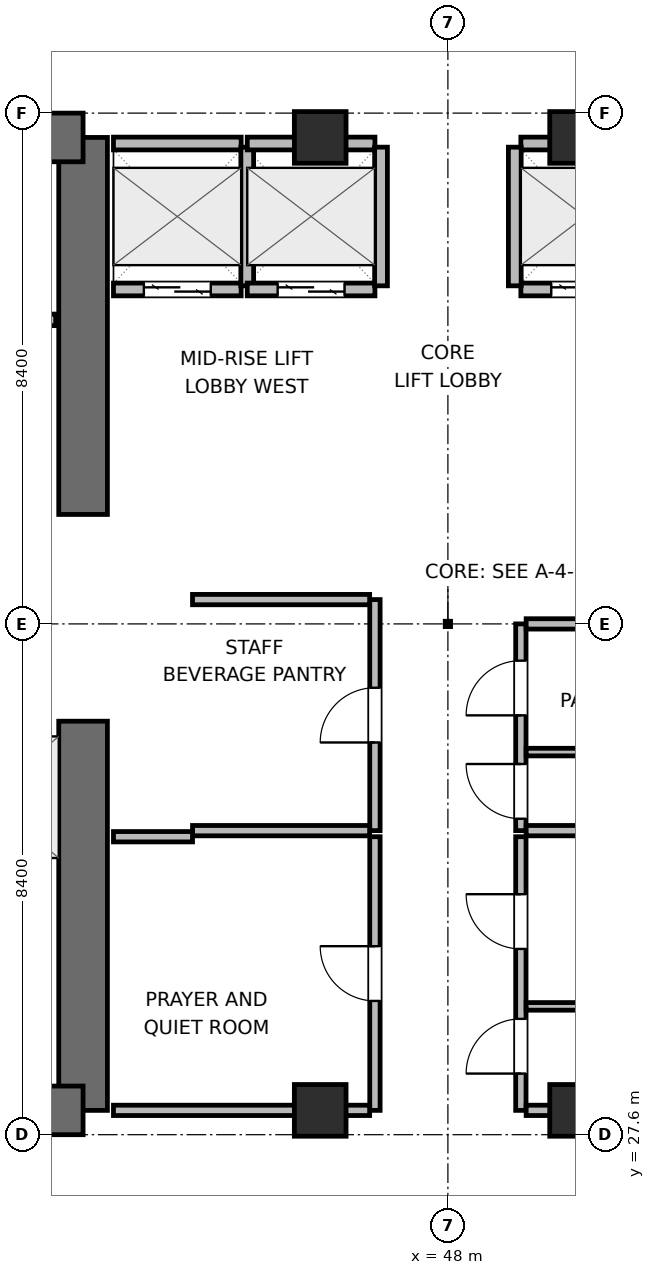
"""IFC4 building model, lengths in metres.
Left out: names, types, materials, properties, quantities, classifications, styles, units other than length and angle.
Written with IfcOpenShell. Run it as: python <this file> out.ifc"""

import sys

from ifc_helpers import new_model, si_unit, direction, frame, frame_2d, origin, origin_2d, place, context, subcontext, project, spatial, rectangle, extrude, element, fill, save


model = new_model("IFC4")
c1 = context("Model", 3, precision=1e-05, world=origin(), true_north=direction((0.0, 1.0)))
c2 = subcontext(c1, "Body", "Model", "MODEL_VIEW")
j1 = project(units=[si_unit("LENGTHUNIT", "METRE"), si_unit("PLANEANGLEUNIT", "RADIAN")], contexts=[c1])
p1 = place(None, origin())
s1 = spatial("IfcSite", under=j1, at=p1, CompositionType="ELEMENT")
p2 = place(p1, origin())
s2 = spatial("IfcBuilding", under=s1, at=p2, CompositionType="ELEMENT")
p3 = place(p2, frame((0.0, 0.0, 158.4)))
s3 = spatial("IfcBuildingStorey", under=s2, at=p3, CompositionType="ELEMENT", Elevation=158.4)
p4 = place(p3, frame((42.0, 28.0, 0.0), z_axis=(0.0, 0.0, 1.0), x_axis=(0.0, 1.0, 0.0)))
e1 = element("IfcWall", 1, at=p4, inside=s3, PredefinedType="SHEAR", context=c2, shape_type="SweptSolid", body=[
    extrude(rectangle(XDim=6.4, YDim=0.8, at=frame_2d((3.2, 0.0))), origin(), (0.0, 0.0, 1.0), 3.9),
])
p5 = place(p3, frame((42.0, 37.8, 0.0), z_axis=(0.0, 0.0, 1.0), x_axis=(0.0, 1.0, 0.0)))
e2 = element("IfcWall", 2, at=p5, inside=s3, PredefinedType="SHEAR", context=c2, shape_type="SweptSolid", body=[
    extrude(rectangle(XDim=6.2, YDim=0.8, at=frame_2d((3.1, 0.0))), origin(), (0.0, 0.0, 1.0), 3.9),
])
p6 = place(p3, frame((32.8, 28.0, 0.0), z_axis=(0.0, 0.0, 1.0), x_axis=(1.0, 0.0, 0.0)))
e3 = element("IfcWall", 3, at=p6, inside=s3, PredefinedType="SHEAR", context=c2, shape_type="SweptSolid", body=[
    extrude(rectangle(XDim=9.2, YDim=0.8, at=frame_2d((4.6, 0.0))), origin(), (0.0, 0.0, 1.0), 3.9),
])
p7 = place(p6, frame((5.025, 0.0, 0.0)))
e4 = element("IfcOpeningElement", 4, at=p7, cuts=e3, PredefinedType="OPENING", context=c2, shape_type="SweptSolid", body=[
    extrude(rectangle(XDim=1.05, YDim=2.04, at=frame_2d((0.525, 1.02))), frame((0.0, 0.41, 0.0), z_axis=(0.0, -1.0, 0.0), x_axis=(1.0, 0.0, 0.0)), (0.0, 0.0, 1.0), 0.82),
])
p8 = place(p3, frame((32.8, 44.0, 0.0), z_axis=(0.0, 0.0, 1.0), x_axis=(1.0, 0.0, 0.0)))
e5 = element("IfcWall", 5, at=p8, inside=s3, PredefinedType="SHEAR", context=c2, shape_type="SweptSolid", body=[
    extrude(rectangle(XDim=9.2, YDim=0.8, at=frame_2d((4.6, 0.0))), origin(), (0.0, 0.0, 1.0), 3.9),
])
p9 = place(p8, frame((1.025, 0.0, 0.0)))
e6 = element("IfcOpeningElement", 6, at=p9, cuts=e5, PredefinedType="OPENING", context=c2, shape_type="SweptSolid", body=[
    extrude(rectangle(XDim=0.95, YDim=2.04, at=frame_2d((0.475, 1.02))), frame((0.0, 0.41, 0.0), z_axis=(0.0, -1.0, 0.0), x_axis=(1.0, 0.0, 0.0)), (0.0, 0.0, 1.0), 0.82),
])
p10 = place(p8, frame((4.275, 0.0, 0.0)))
e7 = element("IfcOpeningElement", 7, at=p10, cuts=e5, PredefinedType="OPENING", context=c2, shape_type="SweptSolid", body=[
    extrude(rectangle(XDim=0.9, YDim=2.02, at=frame_2d((0.45, 1.01))), frame((0.0, 0.41, 0.0), z_axis=(0.0, -1.0, 0.0), x_axis=(1.0, 0.0, 0.0)), (0.0, 0.0, 1.0), 0.82),
])
p11 = place(p8, frame((7.175, 0.0, 0.0)))
e8 = element("IfcOpeningElement", 8, at=p11, cuts=e5, PredefinedType="OPENING", context=c2, shape_type="SweptSolid", body=[
    extrude(rectangle(XDim=0.9, YDim=2.02, at=frame_2d((0.45, 1.01))), frame((0.0, 0.41, 0.0), z_axis=(0.0, -1.0, 0.0), x_axis=(1.0, 0.0, 0.0)), (0.0, 0.0, 1.0), 0.82),
])
for number, where, z_axis, x_axis in (
    (9, (45.9, 28.0, 0.0), (0.0, 0.0, 1.0), (1.0, 0.0, 0.0)),
    (10, (50.1, 28.0, 0.0), (0.0, 0.0, 1.0), (1.0, 0.0, 0.0)),
    (11, (45.9, 44.0, 0.0), (0.0, 0.0, 1.0), (1.0, 0.0, 0.0)),
    (12, (50.1, 44.0, 0.0), (0.0, 0.0, 1.0), (1.0, 0.0, 0.0)),
):
    element("IfcColumn", number, at=place(p3, frame(where, z_axis=z_axis, x_axis=x_axis)), inside=s3, PredefinedType="COLUMN", context=c2, shape_type="SweptSolid", body=[
        extrude(rectangle(XDim=0.85, YDim=0.85, at=origin_2d()), origin(), (0.0, 0.0, 1.0), 3.9),
    ])
p12 = place(p3, frame((33.25, 41.0, 0.0), z_axis=(0.0, 0.0, 1.0), x_axis=(1.0, 0.0, 0.0)))
e13 = element("IfcWall", 13, at=p12, inside=s3, PredefinedType="PLUMBINGWALL", context=c2, shape_type="SweptSolid", body=[
    extrude(rectangle(XDim=8.3, YDim=0.19, at=frame_2d((4.15, 0.0))), origin(), (0.0, 0.0, 1.0), 3.68),
])
p13 = place(p3, frame((42.5, 41.5, 0.0), z_axis=(0.0, 0.0, 1.0), x_axis=(1.0, 0.0, 0.0)))
e14 = element("IfcWall", 14, at=p13, inside=s3, PredefinedType="PARTITIONING", context=c2, shape_type="SweptSolid", body=[
    extrude(rectangle(XDim=2.1, YDim=0.21, at=frame_2d((1.05, 0.0))), origin(), (0.0, 0.0, 1.0), 3.68),
])
p14 = place(p13, frame((0.5, 0.0, 0.0)))
e15 = element("IfcOpeningElement", 15, at=p14, cuts=e14, PredefinedType="OPENING", context=c2, shape_type="SweptSolid", body=[
    extrude(rectangle(XDim=1.1, YDim=2.04, at=frame_2d((0.55, 1.02))), frame((0.0, 0.115, 0.0), z_axis=(0.0, -1.0, 0.0), x_axis=(1.0, 0.0, 0.0)), (0.0, 0.0, 1.0), 0.23),
])
p15 = place(p3, frame((42.5, 43.9, 0.0), z_axis=(0.0, 0.0, 1.0), x_axis=(1.0, 0.0, 0.0)))
e16 = element("IfcWall", 16, at=p15, inside=s3, PredefinedType="PARTITIONING", context=c2, shape_type="SweptSolid", body=[
    extrude(rectangle(XDim=2.1, YDim=0.21, at=frame_2d((1.05, 0.0))), origin(), (0.0, 0.0, 1.0), 2.565),
])
p16 = place(p3, frame((44.7, 41.56, 0.0), z_axis=(0.0, 0.0, 1.0), x_axis=(0.0, 1.0, 0.0)))
e17 = element("IfcWall", 17, at=p16, inside=s3, PredefinedType="PARTITIONING", context=c2, shape_type="SweptSolid", body=[
    extrude(rectangle(XDim=2.28, YDim=0.21, at=frame_2d((1.14, 0.0))), origin(), (0.0, 0.0, 1.0), 3.68),
])
p17 = place(p3, frame((44.7, 41.5, 0.0), z_axis=(0.0, 0.0, 1.0), x_axis=(1.0, 0.0, 0.0)))
e18 = element("IfcWall", 18, at=p17, inside=s3, PredefinedType="PARTITIONING", context=c2, shape_type="SweptSolid", body=[
    extrude(rectangle(XDim=2.1, YDim=0.21, at=frame_2d((1.05, 0.0))), origin(), (0.0, 0.0, 1.0), 3.68),
])
p18 = place(p17, frame((0.5, 0.0, 0.0)))
e19 = element("IfcOpeningElement", 19, at=p18, cuts=e18, PredefinedType="OPENING", context=c2, shape_type="SweptSolid", body=[
    extrude(rectangle(XDim=1.1, YDim=2.04, at=frame_2d((0.55, 1.02))), frame((0.0, 0.115, 0.0), z_axis=(0.0, -1.0, 0.0), x_axis=(1.0, 0.0, 0.0)), (0.0, 0.0, 1.0), 0.23),
])
p19 = place(p3, frame((44.7, 43.9, 0.0), z_axis=(0.0, 0.0, 1.0), x_axis=(1.0, 0.0, 0.0)))
e20 = element("IfcWall", 20, at=p19, inside=s3, PredefinedType="PARTITIONING", context=c2, shape_type="SweptSolid", body=[
    extrude(rectangle(XDim=2.1, YDim=0.21, at=frame_2d((1.05, 0.0))), origin(), (0.0, 0.0, 1.0), 2.565),
])
p20 = place(p3, frame((46.9, 41.56, 0.0), z_axis=(0.0, 0.0, 1.0), x_axis=(0.0, 1.0, 0.0)))
e21 = element("IfcWall", 21, at=p20, inside=s3, PredefinedType="PARTITIONING", context=c2, shape_type="SweptSolid", body=[
    extrude(rectangle(XDim=2.28, YDim=0.21, at=frame_2d((1.14, 0.0))), origin(), (0.0, 0.0, 1.0), 3.68),
])
p21 = place(p3, frame((49.2, 41.5, 0.0), z_axis=(0.0, 0.0, 1.0), x_axis=(1.0, 0.0, 0.0)))
e22 = element("IfcWall", 22, at=p21, inside=s3, PredefinedType="PARTITIONING", context=c2, shape_type="SweptSolid", body=[
    extrude(rectangle(XDim=2.1, YDim=0.21, at=frame_2d((1.05, 0.0))), origin(), (0.0, 0.0, 1.0), 3.68),
])
p22 = place(p21, frame((0.5, 0.0, 0.0)))
e23 = element("IfcOpeningElement", 23, at=p22, cuts=e22, PredefinedType="OPENING", context=c2, shape_type="SweptSolid", body=[
    extrude(rectangle(XDim=1.1, YDim=2.04, at=frame_2d((0.55, 1.02))), frame((0.0, 0.115, 0.0), z_axis=(0.0, -1.0, 0.0), x_axis=(1.0, 0.0, 0.0)), (0.0, 0.0, 1.0), 0.23),
])
p23 = place(p3, frame((49.2, 43.9, 0.0), z_axis=(0.0, 0.0, 1.0), x_axis=(1.0, 0.0, 0.0)))
e24 = element("IfcWall", 24, at=p23, inside=s3, PredefinedType="PARTITIONING", context=c2, shape_type="SweptSolid", body=[
    extrude(rectangle(XDim=2.1, YDim=0.21, at=frame_2d((1.05, 0.0))), origin(), (0.0, 0.0, 1.0), 2.565),
])
p24 = place(p3, frame((49.1, 41.56, 0.0), z_axis=(0.0, 0.0, 1.0), x_axis=(0.0, 1.0, 0.0)))
e25 = element("IfcWall", 25, at=p24, inside=s3, PredefinedType="PARTITIONING", context=c2, shape_type="SweptSolid", body=[
    extrude(rectangle(XDim=2.28, YDim=0.21, at=frame_2d((1.14, 0.0))), origin(), (0.0, 0.0, 1.0), 3.68),
])
p25 = place(p3, frame((46.8, 32.6, 0.0), z_axis=(0.0, 0.0, 1.0), x_axis=(0.0, 1.0, 0.0)))
e26 = element("IfcWall", 26, at=p25, inside=s3, PredefinedType="PARTITIONING", context=c2, shape_type="SweptSolid", body=[
    extrude(rectangle(XDim=3.8, YDim=0.17, at=frame_2d((1.9, 0.0))), origin(), (0.0, 0.0, 1.0), 3.68),
])
p26 = place(p25, frame((1.45, 0.0, 0.0)))
e27 = element("IfcOpeningElement", 27, at=p26, cuts=e26, PredefinedType="OPENING", context=c2, shape_type="SweptSolid", body=[
    extrude(rectangle(XDim=0.9, YDim=2.02, at=frame_2d((0.45, 1.01))), frame((0.0, 0.095, 0.0), z_axis=(0.0, -1.0, 0.0), x_axis=(1.0, 0.0, 0.0)), (0.0, 0.0, 1.0), 0.19),
])
for number, where, z_axis, x_axis in (
    (28, (43.8, 32.6, 0.0), (0.0, 0.0, 1.0), (1.0, 0.0, 0.0)),
    (29, (43.8, 36.4, 0.0), (0.0, 0.0, 1.0), (1.0, 0.0, 0.0)),
):
    element("IfcWall", number, at=place(p3, frame(where, z_axis=z_axis, x_axis=x_axis)), inside=s3, PredefinedType="PARTITIONING", context=c2, shape_type="SweptSolid", body=[
        extrude(rectangle(XDim=2.913, YDim=0.17, at=frame_2d((1.457, 0.0))), origin(), (0.0, 0.0, 1.0), 3.68),
    ])
p27 = place(p3, frame((49.2, 32.6, 0.0), z_axis=(0.0, 0.0, 1.0), x_axis=(0.0, 1.0, 0.0)))
e30 = element("IfcWall", 30, at=p27, inside=s3, PredefinedType="PARTITIONING", context=c2, shape_type="SweptSolid", body=[
    extrude(rectangle(XDim=3.4, YDim=0.17, at=frame_2d((1.7, 0.0))), origin(), (0.0, 0.0, 1.0), 3.68),
])
p28 = place(p27, frame((0.196, 0.0, 0.0)))
e31 = element("IfcOpeningElement", 31, at=p28, cuts=e30, PredefinedType="OPENING", context=c2, shape_type="SweptSolid", body=[
    extrude(rectangle(XDim=0.9, YDim=2.02, at=frame_2d((0.45, 1.01))), frame((0.0, 0.095, 0.0), z_axis=(0.0, -1.0, 0.0), x_axis=(1.0, 0.0, 0.0)), (0.0, 0.0, 1.0), 0.19),
])
p29 = place(p27, frame((1.896, 0.0, 0.0)))
e32 = element("IfcOpeningElement", 32, at=p29, cuts=e30, PredefinedType="OPENING", context=c2, shape_type="SweptSolid", body=[
    extrude(rectangle(XDim=0.9, YDim=2.02, at=frame_2d((0.45, 1.01))), frame((0.0, 0.095, 0.0), z_axis=(0.0, -1.0, 0.0), x_axis=(1.0, 0.0, 0.0)), (0.0, 0.0, 1.0), 0.19),
])
for number, where, z_axis, x_axis in (
    (33, (49.287, 32.6, 0.0), (0.0, 0.0, 1.0), (1.0, 0.0, 0.0)),
    (34, (49.287, 36.0, 0.0), (0.0, 0.0, 1.0), (1.0, 0.0, 0.0)),
):
    element("IfcWall", number, at=place(p3, frame(where, z_axis=z_axis, x_axis=x_axis)), inside=s3, PredefinedType="PARTITIONING", context=c2, shape_type="SweptSolid", body=[
        extrude(rectangle(XDim=2.913, YDim=0.17, at=frame_2d((1.457, 0.0))), origin(), (0.0, 0.0, 1.0), 3.68),
    ])
p30 = place(p3, frame((49.287, 33.892, 0.0), z_axis=(0.0, 0.0, 1.0), x_axis=(1.0, 0.0, 0.0)))
e35 = element("IfcWall", 35, at=p30, inside=s3, PredefinedType="PARTITIONING", context=c2, shape_type="SweptSolid", body=[
    extrude(rectangle(XDim=2.913, YDim=0.125, at=frame_2d((1.457, 0.0))), origin(), (0.0, 0.0, 1.0), 3.68),
])
p31 = place(p3, frame((46.8, 28.0, 0.0), z_axis=(0.0, 0.0, 1.0), x_axis=(0.0, 1.0, 0.0)))
e36 = element("IfcWall", 36, at=p31, inside=s3, PredefinedType="PARTITIONING", context=c2, shape_type="SweptSolid", body=[
    extrude(rectangle(XDim=4.5, YDim=0.17, at=frame_2d((2.25, 0.0))), origin(), (0.0, 0.0, 1.0), 3.68),
])
p32 = place(p31, frame((1.8, 0.0, 0.0)))
e37 = element("IfcOpeningElement", 37, at=p32, cuts=e36, PredefinedType="OPENING", context=c2, shape_type="SweptSolid", body=[
    extrude(rectangle(XDim=0.9, YDim=2.02, at=frame_2d((0.45, 1.01))), frame((0.0, 0.095, 0.0), z_axis=(0.0, -1.0, 0.0), x_axis=(1.0, 0.0, 0.0)), (0.0, 0.0, 1.0), 0.19),
])
p33 = place(p3, frame((42.5, 28.0, 0.0), z_axis=(0.0, 0.0, 1.0), x_axis=(1.0, 0.0, 0.0)))
e38 = element("IfcWall", 38, at=p33, inside=s3, PredefinedType="PARTITIONING", context=c2, shape_type="SweptSolid", body=[
    extrude(rectangle(XDim=4.213, YDim=0.17, at=frame_2d((2.106, 0.0))), origin(), (0.0, 0.0, 1.0), 2.565),
])
p34 = place(p3, frame((42.5, 32.5, 0.0), z_axis=(0.0, 0.0, 1.0), x_axis=(1.0, 0.0, 0.0)))
e39 = element("IfcWall", 39, at=p34, inside=s3, PredefinedType="PARTITIONING", context=c2, shape_type="SweptSolid", body=[
    extrude(rectangle(XDim=1.3, YDim=0.17, at=frame_2d((0.65, 0.0))), origin(), (0.0, 0.0, 1.0), 3.68),
])
p35 = place(p3, frame((49.2, 28.0, 0.0), z_axis=(0.0, 0.0, 1.0), x_axis=(0.0, 1.0, 0.0)))
e40 = element("IfcWall", 40, at=p35, inside=s3, PredefinedType="PARTITIONING", context=c2, shape_type="SweptSolid", body=[
    extrude(rectangle(XDim=4.5, YDim=0.17, at=frame_2d((2.25, 0.0))), origin(), (0.0, 0.0, 1.0), 3.68),
])
p36 = place(p35, frame((0.605, 0.0, 0.0)))
e41 = element("IfcOpeningElement", 41, at=p36, cuts=e40, PredefinedType="OPENING", context=c2, shape_type="SweptSolid", body=[
    extrude(rectangle(XDim=0.9, YDim=2.02, at=frame_2d((0.45, 1.01))), frame((0.0, 0.095, 0.0), z_axis=(0.0, -1.0, 0.0), x_axis=(1.0, 0.0, 0.0)), (0.0, 0.0, 1.0), 0.19),
])
p37 = place(p35, frame((2.655, 0.0, 0.0)))
e42 = element("IfcOpeningElement", 42, at=p37, cuts=e40, PredefinedType="OPENING", context=c2, shape_type="SweptSolid", body=[
    extrude(rectangle(XDim=0.9, YDim=2.02, at=frame_2d((0.45, 1.01))), frame((0.0, 0.095, 0.0), z_axis=(0.0, -1.0, 0.0), x_axis=(1.0, 0.0, 0.0)), (0.0, 0.0, 1.0), 0.19),
])
p38 = place(p3, frame((49.287, 28.0, 0.0), z_axis=(0.0, 0.0, 1.0), x_axis=(1.0, 0.0, 0.0)))
e43 = element("IfcWall", 43, at=p38, inside=s3, PredefinedType="PARTITIONING", context=c2, shape_type="SweptSolid", body=[
    extrude(rectangle(XDim=4.213, YDim=0.17, at=frame_2d((2.106, 0.0))), origin(), (0.0, 0.0, 1.0), 2.565),
])
p39 = place(p3, frame((49.287, 29.71, 0.0), z_axis=(0.0, 0.0, 1.0), x_axis=(1.0, 0.0, 0.0)))
e44 = element("IfcWall", 44, at=p39, inside=s3, PredefinedType="PARTITIONING", context=c2, shape_type="SweptSolid", body=[
    extrude(rectangle(XDim=4.213, YDim=0.125, at=frame_2d((2.106, 0.0))), origin(), (0.0, 0.0, 1.0), 3.68),
])
p40 = place(p14, origin())
e45 = element("IfcDoor", 45, at=p40, inside=s3, OperationType="DOUBLE_DOOR_SLIDING", PredefinedType="DOOR", context=c2, shape_type="SweptSolid", body=[
    extrude(rectangle(XDim=1.1, YDim=2.04, at=frame_2d((0.55, 1.02))), frame((0.0, 0.025, 0.0), z_axis=(0.0, -1.0, 0.0), x_axis=(1.0, 0.0, 0.0)), (0.0, 0.0, 1.0), 0.05),
])
fill(e15, e45)
p41 = place(p18, origin())
e46 = element("IfcDoor", 46, at=p41, inside=s3, OperationType="DOUBLE_DOOR_SLIDING", PredefinedType="DOOR", context=c2, shape_type="SweptSolid", body=[
    extrude(rectangle(XDim=1.1, YDim=2.04, at=frame_2d((0.55, 1.02))), frame((0.0, 0.025, 0.0), z_axis=(0.0, -1.0, 0.0), x_axis=(1.0, 0.0, 0.0)), (0.0, 0.0, 1.0), 0.05),
])
fill(e19, e46)
p42 = place(p22, origin())
e47 = element("IfcDoor", 47, at=p42, inside=s3, OperationType="DOUBLE_DOOR_SLIDING", PredefinedType="DOOR", context=c2, shape_type="SweptSolid", body=[
    extrude(rectangle(XDim=1.1, YDim=2.04, at=frame_2d((0.55, 1.02))), frame((0.0, 0.025, 0.0), z_axis=(0.0, -1.0, 0.0), x_axis=(1.0, 0.0, 0.0)), (0.0, 0.0, 1.0), 0.05),
])
fill(e23, e47)
p43 = place(p26, origin())
e48 = element("IfcDoor", 48, at=p43, inside=s3, OperationType="SINGLE_SWING_LEFT", PredefinedType="DOOR", context=c2, shape_type="SweptSolid", body=[
    extrude(rectangle(XDim=0.9, YDim=2.02, at=frame_2d((0.45, 1.01))), frame((0.0, 0.025, 0.0), z_axis=(0.0, -1.0, 0.0), x_axis=(1.0, 0.0, 0.0)), (0.0, 0.0, 1.0), 0.05),
])
fill(e27, e48)
p44 = place(p28, origin())
e49 = element("IfcDoor", 49, at=p44, inside=s3, OperationType="SINGLE_SWING_RIGHT", PredefinedType="DOOR", context=c2, shape_type="SweptSolid", body=[
    extrude(rectangle(XDim=0.9, YDim=2.02, at=frame_2d((0.45, 1.01))), frame((0.0, 0.025, 0.0), z_axis=(0.0, -1.0, 0.0), x_axis=(1.0, 0.0, 0.0)), (0.0, 0.0, 1.0), 0.05),
])
fill(e31, e49)
p45 = place(p29, origin())
e50 = element("IfcDoor", 50, at=p45, inside=s3, OperationType="SINGLE_SWING_LEFT", PredefinedType="DOOR", context=c2, shape_type="SweptSolid", body=[
    extrude(rectangle(XDim=0.9, YDim=2.02, at=frame_2d((0.45, 1.01))), frame((0.0, 0.025, 0.0), z_axis=(0.0, -1.0, 0.0), x_axis=(1.0, 0.0, 0.0)), (0.0, 0.0, 1.0), 0.05),
])
fill(e32, e50)
p46 = place(p32, origin())
e51 = element("IfcDoor", 51, at=p46, inside=s3, OperationType="SINGLE_SWING_RIGHT", PredefinedType="DOOR", context=c2, shape_type="SweptSolid", body=[
    extrude(rectangle(XDim=0.9, YDim=2.02, at=frame_2d((0.45, 1.01))), frame((0.0, 0.025, 0.0), z_axis=(0.0, -1.0, 0.0), x_axis=(1.0, 0.0, 0.0)), (0.0, 0.0, 1.0), 0.05),
])
fill(e37, e51)
p47 = place(p36, origin())
e52 = element("IfcDoor", 52, at=p47, inside=s3, OperationType="SINGLE_SWING_LEFT", PredefinedType="DOOR", context=c2, shape_type="SweptSolid", body=[
    extrude(rectangle(XDim=0.9, YDim=2.02, at=frame_2d((0.45, 1.01))), frame((0.0, 0.025, 0.0), z_axis=(0.0, -1.0, 0.0), x_axis=(1.0, 0.0, 0.0)), (0.0, 0.0, 1.0), 0.05),
])
fill(e41, e52)
p48 = place(p37, origin())
e53 = element("IfcDoor", 53, at=p48, inside=s3, OperationType="SINGLE_SWING_RIGHT", PredefinedType="DOOR", context=c2, shape_type="SweptSolid", body=[
    extrude(rectangle(XDim=0.9, YDim=2.02, at=frame_2d((0.45, 1.01))), frame((0.0, 0.025, 0.0), z_axis=(0.0, -1.0, 0.0), x_axis=(1.0, 0.0, 0.0)), (0.0, 0.0, 1.0), 0.05),
])
fill(e42, e53)
save(model, sys.argv[1])
